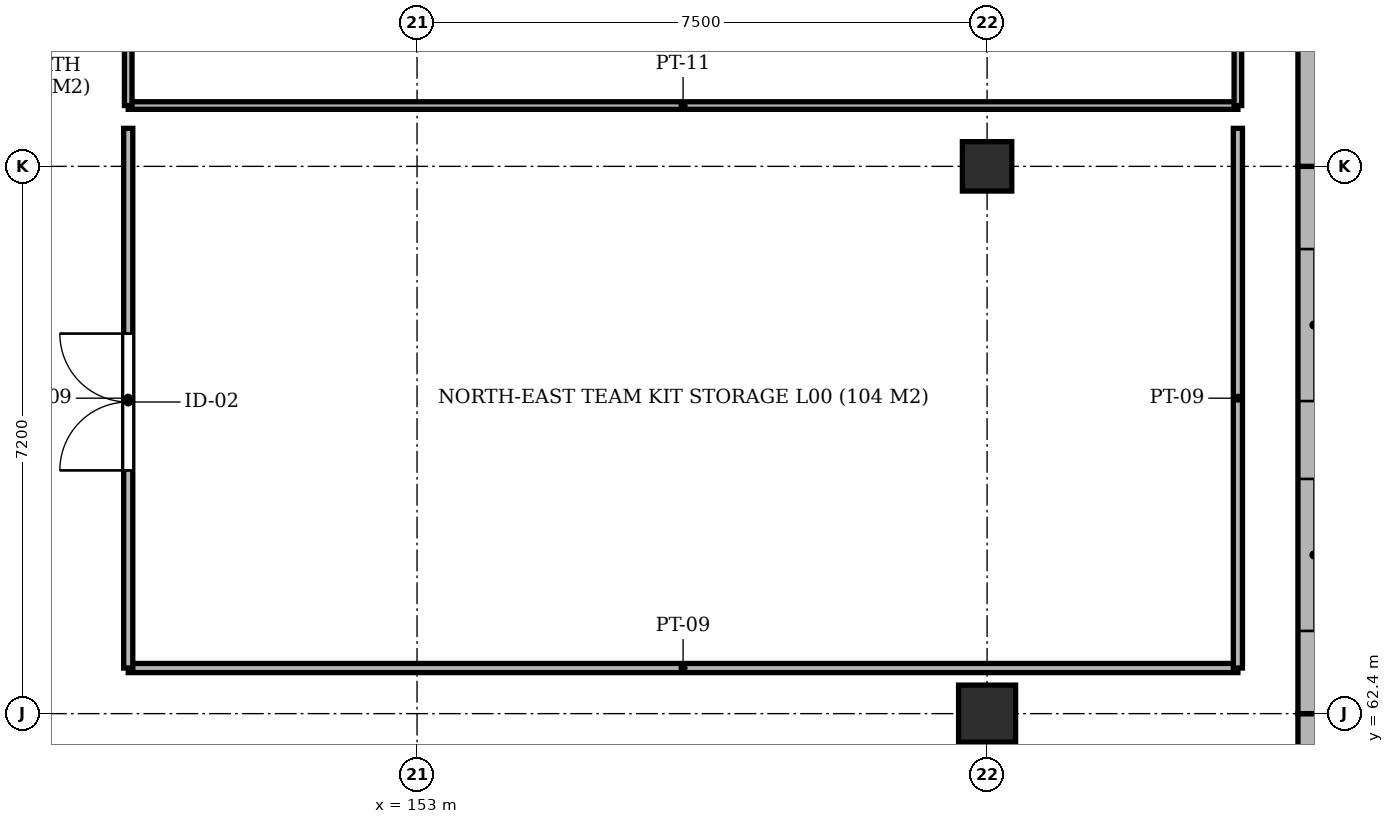
"""IFC4 building model, lengths in metres.
Left out: names, types, materials, properties, quantities, classifications, styles, units other than length and angle.
Written with IfcOpenShell. Run it as: python <this file> out.ifc"""

import sys

from ifc_helpers import new_model, si_unit, direction, frame, frame_2d, origin, origin_2d, place, context, subcontext, project, spatial, rectangle, extrude, element, fill, save


model = new_model("IFC4")
c1 = context("Model", 3, precision=1e-05, world=origin(), true_north=direction((0.0, 1.0)))
c2 = subcontext(c1, "Body", "Model", "MODEL_VIEW")
j1 = project(units=[si_unit("LENGTHUNIT", "METRE"), si_unit("PLANEANGLEUNIT", "RADIAN")], contexts=[c1])
p1 = place(None, origin())
s1 = spatial("IfcSite", under=j1, at=p1, CompositionType="ELEMENT")
p2 = place(p1, origin())
s2 = spatial("IfcBuilding", under=s1, at=p2, CompositionType="ELEMENT")
p3 = place(p2, origin())
s3 = spatial("IfcBuildingStorey", under=s2, at=p3, CompositionType="ELEMENT", Elevation=0.0)
p4 = place(p3, frame((160.5, 62.4, -0.35), z_axis=(0.0, 0.0, 1.0), x_axis=(1.0, 0.0, 0.0)))
e1 = element("IfcColumn", 1, at=p4, inside=s3, PredefinedType="COLUMN", context=c2, shape_type="SweptSolid", body=[
    extrude(rectangle(XDim=0.75, YDim=0.75, at=origin_2d()), origin(), (0.0, 0.0, 1.0), 4.65),
])
p5 = place(p3, frame((160.5, 69.6, -0.35), z_axis=(0.0, 0.0, 1.0), x_axis=(1.0, 0.0, 0.0)))
e2 = element("IfcColumn", 2, at=p5, inside=s3, PredefinedType="COLUMN", context=c2, shape_type="SweptSolid", body=[
    extrude(rectangle(XDim=0.65, YDim=0.65, at=origin_2d()), origin(), (0.0, 0.0, 1.0), 4.65),
])
p6 = place(p3, frame((164.8, 55.2, 0.0), z_axis=(0.0, 0.0, 1.0), x_axis=(0.0, 1.0, 0.0)))
e3 = element("IfcWall", 3, at=p6, inside=s3, PredefinedType="SOLIDWALL", context=c2, shape_type="SweptSolid", body=[
    extrude(rectangle(XDim=7.2, YDim=0.42, at=frame_2d((3.6, 0.0))), origin(), (0.0, 0.0, 1.0), 3.82),
])
p7 = place(p6, frame((1.088, 0.0, 0.92)))
e4 = element("IfcOpeningElement", 4, at=p7, cuts=e3, PredefinedType="OPENING", context=c2, shape_type="SweptSolid", body=[
    extrude(rectangle(XDim=2.0, YDim=1.89, at=frame_2d((1.0, 0.945))), frame((0.0, 0.222, 0.0), z_axis=(0.0, -1.0, 0.0), x_axis=(1.0, 0.0, 0.0)), (0.0, 0.0, 1.0), 0.444),
])
p8 = place(p6, frame((4.112, 0.0, 0.92)))
e5 = element("IfcOpeningElement", 5, at=p8, cuts=e3, PredefinedType="OPENING", context=c2, shape_type="SweptSolid", body=[
    extrude(rectangle(XDim=2.0, YDim=1.89, at=frame_2d((1.0, 0.945))), frame((0.0, 0.222, 0.0), z_axis=(0.0, -1.0, 0.0), x_axis=(1.0, 0.0, 0.0)), (0.0, 0.0, 1.0), 0.444),
])
p9 = place(p3, frame((164.8, 62.4, 0.0), z_axis=(0.0, 0.0, 1.0), x_axis=(0.0, 1.0, 0.0)))
e6 = element("IfcWall", 6, at=p9, inside=s3, PredefinedType="SOLIDWALL", context=c2, shape_type="SweptSolid", body=[
    extrude(rectangle(XDim=7.2, YDim=0.42, at=frame_2d((3.6, 0.0))), origin(), (0.0, 0.0, 1.0), 3.82),
])
p10 = place(p9, frame((1.088, 0.0, 0.92)))
e7 = element("IfcOpeningElement", 7, at=p10, cuts=e6, PredefinedType="OPENING", context=c2, shape_type="SweptSolid", body=[
    extrude(rectangle(XDim=2.0, YDim=1.89, at=frame_2d((1.0, 0.945))), frame((0.0, 0.222, 0.0), z_axis=(0.0, -1.0, 0.0), x_axis=(1.0, 0.0, 0.0)), (0.0, 0.0, 1.0), 0.444),
])
p11 = place(p9, frame((4.112, 0.0, 0.92)))
e8 = element("IfcOpeningElement", 8, at=p11, cuts=e6, PredefinedType="OPENING", context=c2, shape_type="SweptSolid", body=[
    extrude(rectangle(XDim=2.0, YDim=1.89, at=frame_2d((1.0, 0.945))), frame((0.0, 0.222, 0.0), z_axis=(0.0, -1.0, 0.0), x_axis=(1.0, 0.0, 0.0)), (0.0, 0.0, 1.0), 0.444),
])
p12 = place(p3, frame((164.8, 69.6, 0.0), z_axis=(0.0, 0.0, 1.0), x_axis=(0.0, 1.0, 0.0)))
e9 = element("IfcWall", 9, at=p12, inside=s3, PredefinedType="SOLIDWALL", context=c2, shape_type="SweptSolid", body=[
    extrude(rectangle(XDim=7.2, YDim=0.42, at=frame_2d((3.6, 0.0))), origin(), (0.0, 0.0, 1.0), 3.82),
])
p13 = place(p12, frame((4.112, 0.0, 0.92)))
e10 = element("IfcOpeningElement", 10, at=p13, cuts=e9, PredefinedType="OPENING", context=c2, shape_type="SweptSolid", body=[
    extrude(rectangle(XDim=2.0, YDim=1.89, at=frame_2d((1.0, 0.945))), frame((0.0, 0.222, 0.0), z_axis=(0.0, -1.0, 0.0), x_axis=(1.0, 0.0, 0.0)), (0.0, 0.0, 1.0), 0.444),
])
p14 = place(p3, frame((149.2, 70.4, 0.0), z_axis=(0.0, 0.0, 1.0), x_axis=(1.0, 0.0, 0.0)))
e11 = element("IfcWall", 11, at=p14, inside=s3, PredefinedType="PARTITIONING", context=c2, shape_type="SweptSolid", body=[
    extrude(rectangle(XDim=14.6, YDim=0.1, at=frame_2d((7.3, 0.0))), origin(), (0.0, 0.0, 1.0), 3.88),
])
p15 = place(p3, frame((149.2, 70.4, 0.0), z_axis=(0.0, 0.0, 1.0), x_axis=(0.0, 1.0, 0.0)))
e12 = element("IfcWall", 12, at=p15, inside=s3, PredefinedType="PARTITIONING", context=c2, shape_type="SweptSolid", body=[
    extrude(rectangle(XDim=12.8, YDim=0.1, at=frame_2d((6.4, 0.0))), origin(), (0.0, 0.0, 1.0), 3.88),
])
p16 = place(p15, frame((5.5, 0.0, 0.0)))
e13 = element("IfcOpeningElement", 13, at=p16, cuts=e12, PredefinedType="OPENING", context=c2, shape_type="SweptSolid", body=[
    extrude(rectangle(XDim=1.8, YDim=2.25, at=frame_2d((0.9, 1.125))), frame((0.0, 0.062, 0.0), z_axis=(0.0, -1.0, 0.0), x_axis=(1.0, 0.0, 0.0)), (0.0, 0.0, 1.0), 0.124),
])
p17 = place(p3, frame((163.8, 70.4, 0.0), z_axis=(0.0, 0.0, 1.0), x_axis=(0.0, 1.0, 0.0)))
e14 = element("IfcWall", 14, at=p17, inside=s3, PredefinedType="PARTITIONING", context=c2, shape_type="SweptSolid", body=[
    extrude(rectangle(XDim=12.8, YDim=0.1, at=frame_2d((6.4, 0.0))), origin(), (0.0, 0.0, 1.0), 3.88),
])
p18 = place(p3, frame((149.2, 63.0, 0.0), z_axis=(0.0, 0.0, 1.0), x_axis=(1.0, 0.0, 0.0)))
e15 = element("IfcWall", 15, at=p18, inside=s3, PredefinedType="PARTITIONING", context=c2, shape_type="SweptSolid", body=[
    extrude(rectangle(XDim=14.6, YDim=0.12, at=frame_2d((7.3, 0.0))), origin(), (0.0, 0.0, 1.0), 3.88),
])
p19 = place(p3, frame((149.2, 63.0, 0.0), z_axis=(0.0, 0.0, 1.0), x_axis=(0.0, 1.0, 0.0)))
e16 = element("IfcWall", 16, at=p19, inside=s3, PredefinedType="PARTITIONING", context=c2, shape_type="SweptSolid", body=[
    extrude(rectangle(XDim=7.1, YDim=0.12, at=frame_2d((3.55, 0.0))), origin(), (0.0, 0.0, 1.0), 3.88),
])
p20 = place(p19, frame((2.6, 0.0, 0.0)))
e17 = element("IfcOpeningElement", 17, at=p20, cuts=e16, PredefinedType="OPENING", context=c2, shape_type="SweptSolid", body=[
    extrude(rectangle(XDim=1.8, YDim=2.25, at=frame_2d((0.9, 1.125))), frame((0.0, 0.072, 0.0), z_axis=(0.0, -1.0, 0.0), x_axis=(1.0, 0.0, 0.0)), (0.0, 0.0, 1.0), 0.144),
])
p21 = place(p3, frame((163.8, 63.0, 0.0), z_axis=(0.0, 0.0, 1.0), x_axis=(0.0, 1.0, 0.0)))
e18 = element("IfcWall", 18, at=p21, inside=s3, PredefinedType="PARTITIONING", context=c2, shape_type="SweptSolid", body=[
    extrude(rectangle(XDim=7.1, YDim=0.12, at=frame_2d((3.55, 0.0))), origin(), (0.0, 0.0, 1.0), 3.88),
])
p22 = place(p10, origin())
e19 = element("IfcWindow", 19, at=p22, inside=s3, PartitioningType="SINGLE_PANEL", PredefinedType="WINDOW", context=c2, shape_type="SweptSolid", body=[
    extrude(rectangle(XDim=2.0, YDim=1.89, at=frame_2d((1.0, 0.945))), frame((0.0, 0.03, 0.0), z_axis=(0.0, -1.0, 0.0), x_axis=(1.0, 0.0, 0.0)), (0.0, 0.0, 1.0), 0.06),
])
fill(e7, e19)
p23 = place(p11, origin())
e20 = element("IfcWindow", 20, at=p23, inside=s3, PartitioningType="SINGLE_PANEL", PredefinedType="WINDOW", context=c2, shape_type="SweptSolid", body=[
    extrude(rectangle(XDim=2.0, YDim=1.89, at=frame_2d((1.0, 0.945))), frame((0.0, 0.03, 0.0), z_axis=(0.0, -1.0, 0.0), x_axis=(1.0, 0.0, 0.0)), (0.0, 0.0, 1.0), 0.06),
])
fill(e8, e20)
p24 = place(p20, origin())
e21 = element("IfcDoor", 21, at=p24, inside=s3, OperationType="DOUBLE_DOOR_SINGLE_SWING", PredefinedType="DOOR", context=c2, shape_type="SweptSolid", body=[
    extrude(rectangle(XDim=1.8, YDim=2.25, at=frame_2d((0.9, 1.125))), frame((0.0, 0.025, 0.0), z_axis=(0.0, -1.0, 0.0), x_axis=(1.0, 0.0, 0.0)), (0.0, 0.0, 1.0), 0.05),
])
fill(e17, e21)
save(model, sys.argv[1])
